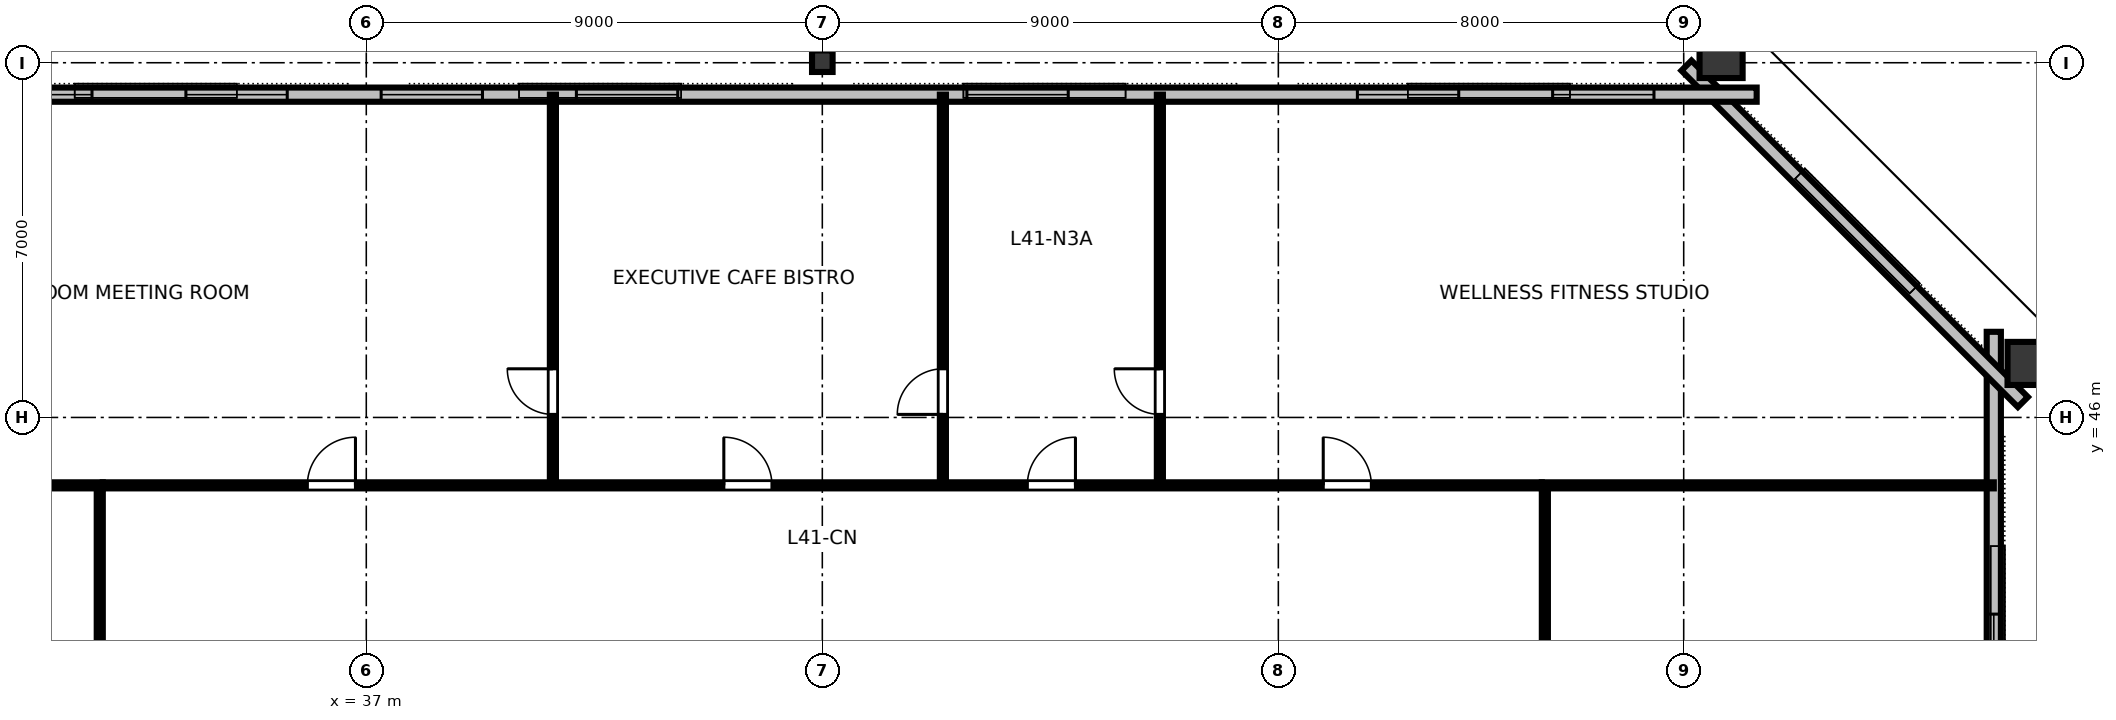
"""IFC4 building model, lengths in metres.
Left out: names, types, materials, properties, quantities, classifications, styles, units other than length and angle.
Written with IfcOpenShell. Run it as: python <this file> out.ifc"""

import sys

from ifc_helpers import new_model, si_unit, direction, frame, frame_2d, origin, origin_2d, place, context, subcontext, project, spatial, rectangle, hollow_rectangle, i_section, extrude, element, fill, save


model = new_model("IFC4")
c1 = context("Model", 3, precision=1e-05, world=origin(), true_north=direction((0.0, 1.0)))
c2 = subcontext(c1, "Body", "Model", "MODEL_VIEW")
j1 = project(units=[si_unit("LENGTHUNIT", "METRE"), si_unit("PLANEANGLEUNIT", "RADIAN")], contexts=[c1])
p1 = place(None, origin())
s1 = spatial("IfcSite", under=j1, at=p1, CompositionType="ELEMENT")
p2 = place(p1, origin())
s2 = spatial("IfcBuilding", under=s1, at=p2, CompositionType="ELEMENT")
p3 = place(p2, frame((0.0, 0.0, 156.4)))
s3 = spatial("IfcBuildingStorey", under=s2, at=p3, CompositionType="ELEMENT", Elevation=156.4)
p4 = place(p3, frame((69.891, 47.066, 0.0), z_axis=(0.088690794811, 0.044634763783, 0.995058631829), x_axis=(-0.888844480388, -0.447322222186, 0.099289068996)))
e1 = element("IfcColumn", 1, at=p4, inside=s3, PredefinedType="COLUMN", context=c2, shape_type="SweptSolid", body=[
    extrude(hollow_rectangle(XDim=0.85, YDim=1.0, WallThickness=0.05, at=origin_2d()), origin(), (0.0, 0.0, 1.0), 3.375),
])
p5 = place(p3, frame((63.738, 53.198, 0.0), z_axis=(0.059345391748, 0.074109367256, 0.995482760355), x_axis=(-0.780571247111, 0.625066818975, 0.0)))
e2 = element("IfcColumn", 2, at=p5, inside=s3, PredefinedType="COLUMN", context=c2, shape_type="SweptSolid", body=[
    extrude(hollow_rectangle(XDim=0.85, YDim=1.0, WallThickness=0.05, at=origin_2d()), origin(), (0.0, 0.0, 1.0), 3.373),
])
p6 = place(p3, frame((46.0, 53.03, 0.0), z_axis=(0.0, 0.074240214963, 0.997240387511), x_axis=(-1.0, 0.0, 0.0)))
e3 = element("IfcColumn", 3, at=p6, inside=s3, PredefinedType="COLUMN", context=c2, shape_type="SweptSolid", body=[
    extrude(i_section(OverallWidth=0.406, OverallDepth=0.425, WebThickness=0.033, FlangeThickness=0.052, FilletRadius=0.025, at=origin_2d()), origin(), (0.0, 0.0, 1.0), 3.367),
])
p7 = place(p3, frame((69.12, 16.31, 0.0), z_axis=(0.0, 0.0, 1.0), x_axis=(0.0, 1.0, 0.0)))
e4 = element("IfcWall", 4, at=p7, inside=s3, PredefinedType="STANDARD", context=c2, shape_type="SweptSolid", body=[
    extrude(rectangle(XDim=31.38, YDim=0.28, at=frame_2d((15.69, 0.0))), origin(), (0.0, 0.0, 1.0), 3.36),
])
p8 = place(p7, frame((5.571, 0.0, 0.8)))
e5 = element("IfcOpeningElement", 5, at=p8, cuts=e4, PredefinedType="OPENING", context=c2, shape_type="SweptSolid", body=[
    extrude(rectangle(XDim=2.0, YDim=1.95, at=frame_2d((1.0, 0.975))), frame((0.0, 0.15, 0.0), z_axis=(0.0, -1.0, 0.0), x_axis=(1.0, 0.0, 0.0)), (0.0, 0.0, 1.0), 0.3),
])
p9 = place(p7, frame((9.219, 0.0, 0.8)))
e6 = element("IfcOpeningElement", 6, at=p9, cuts=e4, PredefinedType="OPENING", context=c2, shape_type="SweptSolid", body=[
    extrude(rectangle(XDim=2.0, YDim=1.95, at=frame_2d((1.0, 0.975))), frame((0.0, 0.15, 0.0), z_axis=(0.0, -1.0, 0.0), x_axis=(1.0, 0.0, 0.0)), (0.0, 0.0, 1.0), 0.3),
])
p10 = place(p7, frame((12.866, 0.0, 0.8)))
e7 = element("IfcOpeningElement", 7, at=p10, cuts=e4, PredefinedType="OPENING", context=c2, shape_type="SweptSolid", body=[
    extrude(rectangle(XDim=2.0, YDim=1.95, at=frame_2d((1.0, 0.975))), frame((0.0, 0.15, 0.0), z_axis=(0.0, -1.0, 0.0), x_axis=(1.0, 0.0, 0.0)), (0.0, 0.0, 1.0), 0.3),
])
p11 = place(p7, frame((16.514, 0.0, 0.8)))
e8 = element("IfcOpeningElement", 8, at=p11, cuts=e4, PredefinedType="OPENING", context=c2, shape_type="SweptSolid", body=[
    extrude(rectangle(XDim=2.0, YDim=1.95, at=frame_2d((1.0, 0.975))), frame((0.0, 0.15, 0.0), z_axis=(0.0, -1.0, 0.0), x_axis=(1.0, 0.0, 0.0)), (0.0, 0.0, 1.0), 0.3),
])
p12 = place(p7, frame((20.161, 0.0, 0.8)))
e9 = element("IfcOpeningElement", 9, at=p12, cuts=e4, PredefinedType="OPENING", context=c2, shape_type="SweptSolid", body=[
    extrude(rectangle(XDim=2.0, YDim=1.95, at=frame_2d((1.0, 0.975))), frame((0.0, 0.15, 0.0), z_axis=(0.0, -1.0, 0.0), x_axis=(1.0, 0.0, 0.0)), (0.0, 0.0, 1.0), 0.3),
])
p13 = place(p7, frame((23.809, 0.0, 0.8)))
e10 = element("IfcOpeningElement", 10, at=p13, cuts=e4, PredefinedType="OPENING", context=c2, shape_type="SweptSolid", body=[
    extrude(rectangle(XDim=2.0, YDim=1.95, at=frame_2d((1.0, 0.975))), frame((0.0, 0.15, 0.0), z_axis=(0.0, -1.0, 0.0), x_axis=(1.0, 0.0, 0.0)), (0.0, 0.0, 1.0), 0.3),
])
p14 = place(p3, frame((69.694, 46.304, 0.0), z_axis=(0.0, 0.0, 1.0), x_axis=(-0.707106781187, 0.707106781187, 0.0)))
e11 = element("IfcWall", 11, at=p14, inside=s3, PredefinedType="STANDARD", context=c2, shape_type="SweptSolid", body=[
    extrude(rectangle(XDim=9.39, YDim=0.28, at=frame_2d((4.695, 0.0))), origin(), (0.0, 0.0, 1.0), 3.36),
])
p15 = place(p3, frame((64.44, 52.37, 0.0), z_axis=(0.0, 0.0, 1.0), x_axis=(-1.0, 0.0, 0.0)))
e12 = element("IfcWall", 12, at=p15, inside=s3, PredefinedType="STANDARD", context=c2, shape_type="SweptSolid", body=[
    extrude(rectangle(XDim=36.88, YDim=0.28, at=frame_2d((18.44, 0.0))), origin(), (0.0, 0.0, 1.0), 3.36),
])
p16 = place(p15, frame((2.027, 0.0, 0.8)))
e13 = element("IfcOpeningElement", 13, at=p16, cuts=e12, PredefinedType="OPENING", context=c2, shape_type="SweptSolid", body=[
    extrude(rectangle(XDim=2.0, YDim=1.95, at=frame_2d((1.0, 0.975))), frame((0.0, 0.15, 0.0), z_axis=(0.0, -1.0, 0.0), x_axis=(1.0, 0.0, 0.0)), (0.0, 0.0, 1.0), 0.3),
])
p17 = place(p15, frame((5.88, 0.0, 0.8)))
e14 = element("IfcOpeningElement", 14, at=p17, cuts=e12, PredefinedType="OPENING", context=c2, shape_type="SweptSolid", body=[
    extrude(rectangle(XDim=2.0, YDim=1.95, at=frame_2d((1.0, 0.975))), frame((0.0, 0.15, 0.0), z_axis=(0.0, -1.0, 0.0), x_axis=(1.0, 0.0, 0.0)), (0.0, 0.0, 1.0), 0.3),
])
p18 = place(p15, frame((13.587, 0.0, 0.8)))
e15 = element("IfcOpeningElement", 15, at=p18, cuts=e12, PredefinedType="OPENING", context=c2, shape_type="SweptSolid", body=[
    extrude(rectangle(XDim=2.0, YDim=1.95, at=frame_2d((1.0, 0.975))), frame((0.0, 0.15, 0.0), z_axis=(0.0, -1.0, 0.0), x_axis=(1.0, 0.0, 0.0)), (0.0, 0.0, 1.0), 0.3),
])
p19 = place(p15, frame((21.293, 0.0, 0.8)))
e16 = element("IfcOpeningElement", 16, at=p19, cuts=e12, PredefinedType="OPENING", context=c2, shape_type="SweptSolid", body=[
    extrude(rectangle(XDim=2.0, YDim=1.95, at=frame_2d((1.0, 0.975))), frame((0.0, 0.15, 0.0), z_axis=(0.0, -1.0, 0.0), x_axis=(1.0, 0.0, 0.0)), (0.0, 0.0, 1.0), 0.3),
])
p20 = place(p15, frame((25.147, 0.0, 0.8)))
e17 = element("IfcOpeningElement", 17, at=p20, cuts=e12, PredefinedType="OPENING", context=c2, shape_type="SweptSolid", body=[
    extrude(rectangle(XDim=2.0, YDim=1.95, at=frame_2d((1.0, 0.975))), frame((0.0, 0.15, 0.0), z_axis=(0.0, -1.0, 0.0), x_axis=(1.0, 0.0, 0.0)), (0.0, 0.0, 1.0), 0.3),
])
p21 = place(p15, frame((29.0, 0.0, 0.8)))
e18 = element("IfcOpeningElement", 18, at=p21, cuts=e12, PredefinedType="OPENING", context=c2, shape_type="SweptSolid", body=[
    extrude(rectangle(XDim=2.0, YDim=1.95, at=frame_2d((1.0, 0.975))), frame((0.0, 0.15, 0.0), z_axis=(0.0, -1.0, 0.0), x_axis=(1.0, 0.0, 0.0)), (0.0, 0.0, 1.0), 0.3),
])
p22 = place(p15, frame((32.853, 0.0, 0.8)))
e19 = element("IfcOpeningElement", 19, at=p22, cuts=e12, PredefinedType="OPENING", context=c2, shape_type="SweptSolid", body=[
    extrude(rectangle(XDim=2.0, YDim=1.95, at=frame_2d((1.0, 0.975))), frame((0.0, 0.15, 0.0), z_axis=(0.0, -1.0, 0.0), x_axis=(1.0, 0.0, 0.0)), (0.0, 0.0, 1.0), 0.3),
])
p23 = place(p3, frame((40.683, 44.66, 0.0), z_axis=(0.0, 0.0, 1.0), x_axis=(0.0, 1.0, 0.0)))
e20 = element("IfcWall", 20, at=p23, inside=s3, PredefinedType="PARTITIONING", context=c2, shape_type="SweptSolid", body=[
    extrude(rectangle(XDim=7.71, YDim=0.12, at=frame_2d((3.855, 0.0))), origin(), (0.0, 0.0, 1.0), 2.64),
])
p24 = place(p23, frame((1.4, 0.0, 0.0)))
e21 = element("IfcOpeningElement", 21, at=p24, cuts=e20, PredefinedType="OPENING", context=c2, shape_type="SweptSolid", body=[
    extrude(rectangle(XDim=0.9, YDim=2.15, at=frame_2d((0.45, 1.075))), frame((0.0, 0.07, 0.0), z_axis=(0.0, -1.0, 0.0), x_axis=(1.0, 0.0, 0.0)), (0.0, 0.0, 1.0), 0.14),
])
p25 = place(p3, frame((48.38, 44.66, 0.0), z_axis=(0.0, 0.0, 1.0), x_axis=(0.0, 1.0, 0.0)))
e22 = element("IfcWall", 22, at=p25, inside=s3, PredefinedType="PARTITIONING", context=c2, shape_type="SweptSolid", body=[
    extrude(rectangle(XDim=7.71, YDim=0.12, at=frame_2d((3.855, 0.0))), origin(), (0.0, 0.0, 1.0), 2.64),
])
p26 = place(p25, frame((1.4, 0.0, 0.0)))
e23 = element("IfcOpeningElement", 23, at=p26, cuts=e22, PredefinedType="OPENING", context=c2, shape_type="SweptSolid", body=[
    extrude(rectangle(XDim=0.9, YDim=2.15, at=frame_2d((0.45, 1.075))), frame((0.0, 0.07, 0.0), z_axis=(0.0, -1.0, 0.0), x_axis=(1.0, 0.0, 0.0)), (0.0, 0.0, 1.0), 0.14),
])
p27 = place(p3, frame((52.662, 44.66, 0.0), z_axis=(0.0, 0.0, 1.0), x_axis=(0.0, 1.0, 0.0)))
e24 = element("IfcWall", 24, at=p27, inside=s3, PredefinedType="PARTITIONING", context=c2, shape_type="SweptSolid", body=[
    extrude(rectangle(XDim=7.71, YDim=0.12, at=frame_2d((3.855, 0.0))), origin(), (0.0, 0.0, 1.0), 2.64),
])
p28 = place(p27, frame((1.4, 0.0, 0.0)))
e25 = element("IfcOpeningElement", 25, at=p28, cuts=e24, PredefinedType="OPENING", context=c2, shape_type="SweptSolid", body=[
    extrude(rectangle(XDim=0.9, YDim=2.15, at=frame_2d((0.45, 1.075))), frame((0.0, 0.07, 0.0), z_axis=(0.0, -1.0, 0.0), x_axis=(1.0, 0.0, 0.0)), (0.0, 0.0, 1.0), 0.14),
])
p29 = place(p3, frame((31.8, 44.66, 0.0), z_axis=(0.0, 0.0, 1.0), x_axis=(1.0, 0.0, 0.0)))
e26 = element("IfcWall", 26, at=p29, inside=s3, PredefinedType="PARTITIONING", context=c2, shape_type="SweptSolid", body=[
    extrude(rectangle(XDim=28.4, YDim=0.12, at=frame_2d((14.2, 0.0))), origin(), (0.0, 0.0, 1.0), 2.64),
])
p30 = place(p29, frame((4.036, 0.0, 0.0)))
e27 = element("IfcOpeningElement", 27, at=p30, cuts=e26, PredefinedType="OPENING", context=c2, shape_type="SweptSolid", body=[
    extrude(rectangle(XDim=0.95, YDim=2.15, at=frame_2d((0.475, 1.075))), frame((0.0, 0.07, 0.0), z_axis=(0.0, -1.0, 0.0), x_axis=(1.0, 0.0, 0.0)), (0.0, 0.0, 1.0), 0.14),
])
p31 = place(p29, frame((12.256, 0.0, 0.0)))
e28 = element("IfcOpeningElement", 28, at=p31, cuts=e26, PredefinedType="OPENING", context=c2, shape_type="SweptSolid", body=[
    extrude(rectangle(XDim=0.95, YDim=2.15, at=frame_2d((0.475, 1.075))), frame((0.0, 0.07, 0.0), z_axis=(0.0, -1.0, 0.0), x_axis=(1.0, 0.0, 0.0)), (0.0, 0.0, 1.0), 0.14),
])
p32 = place(p29, frame((18.246, 0.0, 0.0)))
e29 = element("IfcOpeningElement", 29, at=p32, cuts=e26, PredefinedType="OPENING", context=c2, shape_type="SweptSolid", body=[
    extrude(rectangle(XDim=0.95, YDim=2.15, at=frame_2d((0.475, 1.075))), frame((0.0, 0.07, 0.0), z_axis=(0.0, -1.0, 0.0), x_axis=(1.0, 0.0, 0.0)), (0.0, 0.0, 1.0), 0.14),
])
p33 = place(p29, frame((24.086, 0.0, 0.0)))
e30 = element("IfcOpeningElement", 30, at=p33, cuts=e26, PredefinedType="OPENING", context=c2, shape_type="SweptSolid", body=[
    extrude(rectangle(XDim=0.95, YDim=2.15, at=frame_2d((0.475, 1.075))), frame((0.0, 0.07, 0.0), z_axis=(0.0, -1.0, 0.0), x_axis=(1.0, 0.0, 0.0)), (0.0, 0.0, 1.0), 0.14),
])
p34 = place(p3, frame((31.74, 33.02, 0.0), z_axis=(0.0, 0.0, 1.0), x_axis=(0.0, 1.0, 0.0)))
e31 = element("IfcWall", 31, at=p34, inside=s3, PredefinedType="PARTITIONING", context=c2, shape_type="SweptSolid", body=[
    extrude(rectangle(XDim=11.58, YDim=0.12, at=frame_2d((5.79, 0.0))), origin(), (0.0, 0.0, 1.0), 2.64),
])
p35 = place(p34, frame((1.44, 0.0, 0.0)))
e32 = element("IfcOpeningElement", 32, at=p35, cuts=e31, PredefinedType="OPENING", context=c2, shape_type="SweptSolid", body=[
    extrude(rectangle(XDim=0.95, YDim=2.15, at=frame_2d((0.475, 1.075))), frame((0.0, 0.07, 0.0), z_axis=(0.0, -1.0, 0.0), x_axis=(1.0, 0.0, 0.0)), (0.0, 0.0, 1.0), 0.14),
])
p36 = place(p34, frame((7.13, 0.0, 0.0)))
e33 = element("IfcOpeningElement", 33, at=p36, cuts=e31, PredefinedType="OPENING", context=c2, shape_type="SweptSolid", body=[
    extrude(rectangle(XDim=0.95, YDim=2.15, at=frame_2d((0.475, 1.075))), frame((0.0, 0.07, 0.0), z_axis=(0.0, -1.0, 0.0), x_axis=(1.0, 0.0, 0.0)), (0.0, 0.0, 1.0), 0.14),
])
p37 = place(p3, frame((60.26, 33.02, 0.0), z_axis=(0.0, 0.0, 1.0), x_axis=(0.0, 1.0, 0.0)))
e34 = element("IfcWall", 34, at=p37, inside=s3, PredefinedType="PARTITIONING", context=c2, shape_type="SweptSolid", body=[
    extrude(rectangle(XDim=11.58, YDim=0.12, at=frame_2d((5.79, 0.0))), origin(), (0.0, 0.0, 1.0), 2.64),
])
p38 = place(p37, frame((5.215, 0.0, 0.0)))
e35 = element("IfcOpeningElement", 35, at=p38, cuts=e34, PredefinedType="OPENING", context=c2, shape_type="SweptSolid", body=[
    extrude(rectangle(XDim=0.95, YDim=2.15, at=frame_2d((0.475, 1.075))), frame((0.0, 0.07, 0.0), z_axis=(0.0, -1.0, 0.0), x_axis=(1.0, 0.0, 0.0)), (0.0, 0.0, 1.0), 0.14),
])
for number, where, z_axis, x_axis in (
    (36, (31.8, 44.66, 0.0), (0.0, 0.0, 1.0), (-1.0, 0.0, 0.0)),
    (37, (60.2, 44.66, 0.0), (0.0, 0.0, 1.0), (1.0, 0.0, 0.0)),
):
    element("IfcWall", number, at=place(p3, frame(where, z_axis=z_axis, x_axis=x_axis)), inside=s3, PredefinedType="PARTITIONING", context=c2, shape_type="SweptSolid", body=[
        extrude(rectangle(XDim=8.92, YDim=0.12, at=frame_2d((4.46, 0.0))), origin(), (0.0, 0.0, 1.0), 2.64),
    ])
p39 = place(p13, origin())
e38 = element("IfcWindow", 38, at=p39, inside=s3, PartitioningType="SINGLE_PANEL", PredefinedType="WINDOW", context=c2, shape_type="SweptSolid", body=[
    extrude(rectangle(XDim=2.0, YDim=1.95, at=frame_2d((1.0, 0.975))), frame((0.0, 0.03, 0.0), z_axis=(0.0, -1.0, 0.0), x_axis=(1.0, 0.0, 0.0)), (0.0, 0.0, 1.0), 0.06),
])
fill(e10, e38)
p40 = place(p16, origin())
e39 = element("IfcWindow", 39, at=p40, inside=s3, PartitioningType="SINGLE_PANEL", PredefinedType="WINDOW", context=c2, shape_type="SweptSolid", body=[
    extrude(rectangle(XDim=2.0, YDim=1.95, at=frame_2d((1.0, 0.975))), frame((0.0, 0.03, 0.0), z_axis=(0.0, -1.0, 0.0), x_axis=(1.0, 0.0, 0.0)), (0.0, 0.0, 1.0), 0.06),
])
fill(e13, e39)
p41 = place(p17, origin())
e40 = element("IfcWindow", 40, at=p41, inside=s3, PartitioningType="SINGLE_PANEL", PredefinedType="WINDOW", context=c2, shape_type="SweptSolid", body=[
    extrude(rectangle(XDim=2.0, YDim=1.95, at=frame_2d((1.0, 0.975))), frame((0.0, 0.03, 0.0), z_axis=(0.0, -1.0, 0.0), x_axis=(1.0, 0.0, 0.0)), (0.0, 0.0, 1.0), 0.06),
])
fill(e14, e40)
p42 = place(p18, origin())
e41 = element("IfcWindow", 41, at=p42, inside=s3, PartitioningType="SINGLE_PANEL", PredefinedType="WINDOW", context=c2, shape_type="SweptSolid", body=[
    extrude(rectangle(XDim=2.0, YDim=1.95, at=frame_2d((1.0, 0.975))), frame((0.0, 0.03, 0.0), z_axis=(0.0, -1.0, 0.0), x_axis=(1.0, 0.0, 0.0)), (0.0, 0.0, 1.0), 0.06),
])
fill(e15, e41)
p43 = place(p19, origin())
e42 = element("IfcWindow", 42, at=p43, inside=s3, PartitioningType="SINGLE_PANEL", PredefinedType="WINDOW", context=c2, shape_type="SweptSolid", body=[
    extrude(rectangle(XDim=2.0, YDim=1.95, at=frame_2d((1.0, 0.975))), frame((0.0, 0.03, 0.0), z_axis=(0.0, -1.0, 0.0), x_axis=(1.0, 0.0, 0.0)), (0.0, 0.0, 1.0), 0.06),
])
fill(e16, e42)
p44 = place(p20, origin())
e43 = element("IfcWindow", 43, at=p44, inside=s3, PartitioningType="SINGLE_PANEL", PredefinedType="WINDOW", context=c2, shape_type="SweptSolid", body=[
    extrude(rectangle(XDim=2.0, YDim=1.95, at=frame_2d((1.0, 0.975))), frame((0.0, 0.03, 0.0), z_axis=(0.0, -1.0, 0.0), x_axis=(1.0, 0.0, 0.0)), (0.0, 0.0, 1.0), 0.06),
])
fill(e17, e43)
p45 = place(p21, origin())
e44 = element("IfcWindow", 44, at=p45, inside=s3, PartitioningType="SINGLE_PANEL", PredefinedType="WINDOW", context=c2, shape_type="SweptSolid", body=[
    extrude(rectangle(XDim=2.0, YDim=1.95, at=frame_2d((1.0, 0.975))), frame((0.0, 0.03, 0.0), z_axis=(0.0, -1.0, 0.0), x_axis=(1.0, 0.0, 0.0)), (0.0, 0.0, 1.0), 0.06),
])
fill(e18, e44)
p46 = place(p22, origin())
e45 = element("IfcWindow", 45, at=p46, inside=s3, PartitioningType="SINGLE_PANEL", PredefinedType="WINDOW", context=c2, shape_type="SweptSolid", body=[
    extrude(rectangle(XDim=2.0, YDim=1.95, at=frame_2d((1.0, 0.975))), frame((0.0, 0.03, 0.0), z_axis=(0.0, -1.0, 0.0), x_axis=(1.0, 0.0, 0.0)), (0.0, 0.0, 1.0), 0.06),
])
fill(e19, e45)
p47 = place(p24, origin())
e46 = element("IfcDoor", 46, at=p47, inside=s3, OperationType="SINGLE_SWING_RIGHT", PredefinedType="DOOR", context=c2, shape_type="SweptSolid", body=[
    extrude(rectangle(XDim=0.9, YDim=2.15, at=frame_2d((0.45, 1.075))), frame((0.0, 0.025, 0.0), z_axis=(0.0, -1.0, 0.0), x_axis=(1.0, 0.0, 0.0)), (0.0, 0.0, 1.0), 0.05),
])
fill(e21, e46)
p48 = place(p26, origin())
e47 = element("IfcDoor", 47, at=p48, inside=s3, OperationType="SINGLE_SWING_LEFT", PredefinedType="DOOR", context=c2, shape_type="SweptSolid", body=[
    extrude(rectangle(XDim=0.9, YDim=2.15, at=frame_2d((0.45, 1.075))), frame((0.0, 0.025, 0.0), z_axis=(0.0, -1.0, 0.0), x_axis=(1.0, 0.0, 0.0)), (0.0, 0.0, 1.0), 0.05),
])
fill(e23, e47)
p49 = place(p28, origin())
e48 = element("IfcDoor", 48, at=p49, inside=s3, OperationType="SINGLE_SWING_RIGHT", PredefinedType="DOOR", context=c2, shape_type="SweptSolid", body=[
    extrude(rectangle(XDim=0.9, YDim=2.15, at=frame_2d((0.45, 1.075))), frame((0.0, 0.025, 0.0), z_axis=(0.0, -1.0, 0.0), x_axis=(1.0, 0.0, 0.0)), (0.0, 0.0, 1.0), 0.05),
])
fill(e25, e48)
p50 = place(p30, origin())
e49 = element("IfcDoor", 49, at=p50, inside=s3, OperationType="SINGLE_SWING_RIGHT", PredefinedType="DOOR", context=c2, shape_type="SweptSolid", body=[
    extrude(rectangle(XDim=0.95, YDim=2.15, at=frame_2d((0.475, 1.075))), frame((0.0, 0.025, 0.0), z_axis=(0.0, -1.0, 0.0), x_axis=(1.0, 0.0, 0.0)), (0.0, 0.0, 1.0), 0.05),
])
fill(e27, e49)
p51 = place(p31, origin())
e50 = element("IfcDoor", 50, at=p51, inside=s3, OperationType="SINGLE_SWING_LEFT", PredefinedType="DOOR", context=c2, shape_type="SweptSolid", body=[
    extrude(rectangle(XDim=0.95, YDim=2.15, at=frame_2d((0.475, 1.075))), frame((0.0, 0.025, 0.0), z_axis=(0.0, -1.0, 0.0), x_axis=(1.0, 0.0, 0.0)), (0.0, 0.0, 1.0), 0.05),
])
fill(e28, e50)
p52 = place(p32, origin())
e51 = element("IfcDoor", 51, at=p52, inside=s3, OperationType="SINGLE_SWING_RIGHT", PredefinedType="DOOR", context=c2, shape_type="SweptSolid", body=[
    extrude(rectangle(XDim=0.95, YDim=2.15, at=frame_2d((0.475, 1.075))), frame((0.0, 0.025, 0.0), z_axis=(0.0, -1.0, 0.0), x_axis=(1.0, 0.0, 0.0)), (0.0, 0.0, 1.0), 0.05),
])
fill(e29, e51)
p53 = place(p33, origin())
e52 = element("IfcDoor", 52, at=p53, inside=s3, OperationType="SINGLE_SWING_LEFT", PredefinedType="DOOR", context=c2, shape_type="SweptSolid", body=[
    extrude(rectangle(XDim=0.95, YDim=2.15, at=frame_2d((0.475, 1.075))), frame((0.0, 0.025, 0.0), z_axis=(0.0, -1.0, 0.0), x_axis=(1.0, 0.0, 0.0)), (0.0, 0.0, 1.0), 0.05),
])
fill(e30, e52)
save(model, sys.argv[1])
